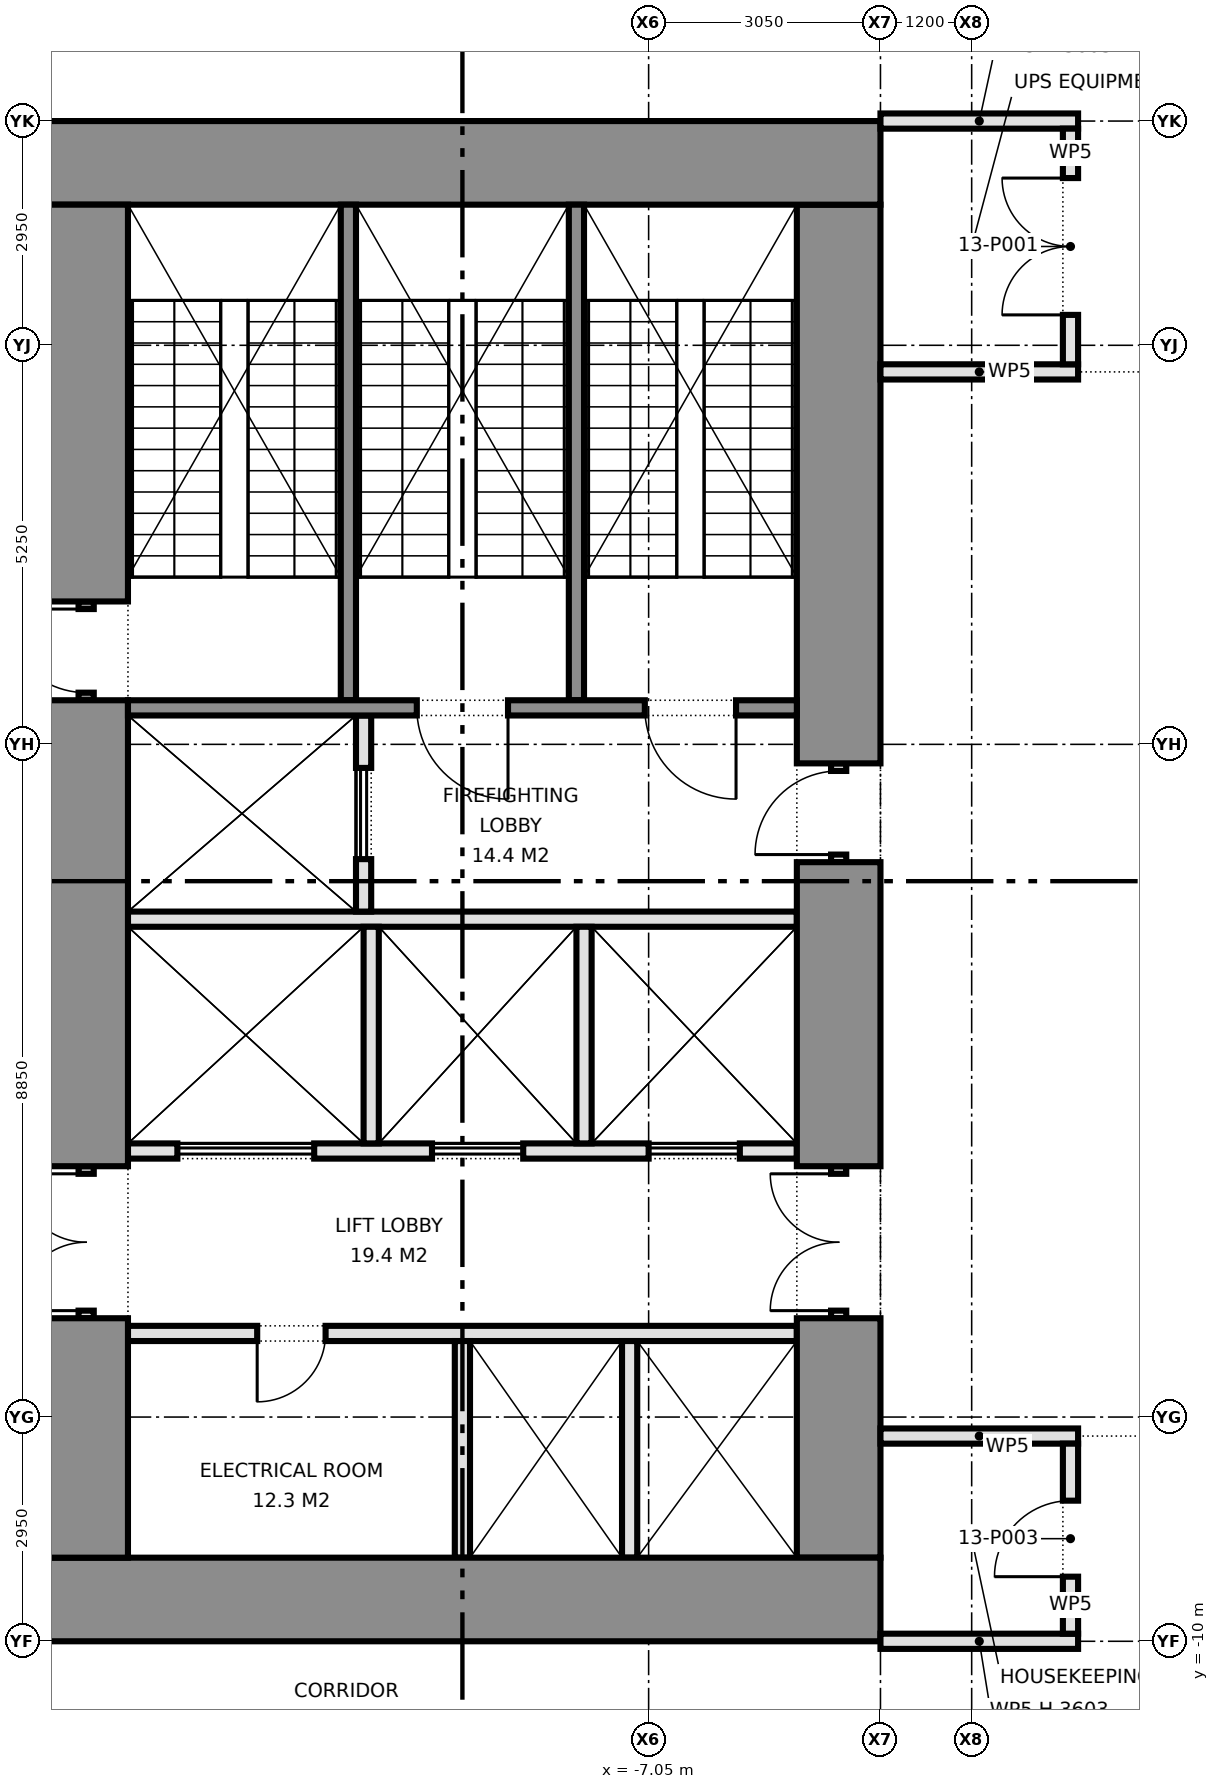
"""IFC4 building model, lengths in metres.
Left out: names, types, materials, properties, quantities, classifications, styles, units other than length and angle.
Written with IfcOpenShell. Run it as: python <this file> out.ifc"""

import sys

from ifc_helpers import new_model, si_unit, direction, frame, frame_2d, origin, place, context, subcontext, project, spatial, rectangle, extrude, element, fill, save


model = new_model("IFC4")
c1 = context("Model", 3, precision=1e-05, world=origin(), true_north=direction((0.0, 1.0)))
c2 = subcontext(c1, "Body", "Model", "MODEL_VIEW")
j1 = project(units=[si_unit("LENGTHUNIT", "METRE"), si_unit("PLANEANGLEUNIT", "RADIAN")], contexts=[c1])
p1 = place(None, origin())
s1 = spatial("IfcSite", under=j1, at=p1, CompositionType="ELEMENT")
p2 = place(p1, origin())
s2 = spatial("IfcBuilding", under=s1, at=p2, CompositionType="ELEMENT")
p3 = place(p2, frame((0.0, 0.0, 59.3)))
s3 = spatial("IfcBuildingStorey", under=s2, at=p3, CompositionType="ELEMENT", Elevation=59.3)
for number, where, z_axis, x_axis in (
    (1, (-15.0, -9.45, 0.0), (0.0, 0.0, 1.0), (1.0, 0.0, 0.0)),
    (2, (-15.0, 9.45, 0.0), (0.0, 0.0, 1.0), (1.0, 0.0, 0.0)),
):
    element("IfcWall", number, at=place(p3, frame(where, z_axis=z_axis, x_axis=x_axis)), inside=s3, PredefinedType="SHEAR", context=c2, shape_type="SweptSolid", body=[
        extrude(rectangle(XDim=11.0, YDim=1.1, at=frame_2d((5.5, 0.0))), origin(), (0.0, 0.0, 1.0), 4.55),
    ])
p4 = place(p3, frame((-14.45, -8.9, 0.0), z_axis=(0.0, 0.0, 1.0), x_axis=(0.0, 1.0, 0.0)))
e3 = element("IfcWall", 3, at=p4, inside=s3, PredefinedType="SHEAR", context=c2, shape_type="SweptSolid", body=[
    extrude(rectangle(XDim=3.15, YDim=1.1, at=frame_2d((1.575, 0.0))), origin(), (0.0, 0.0, 1.0), 4.55),
])
p5 = place(p3, frame((-14.45, -5.75, 0.0), z_axis=(0.0, 0.0, 1.0), x_axis=(0.0, 1.0, 0.0)))
e4 = element("IfcWall", 4, at=p5, inside=s3, PredefinedType="PARTITIONING", context=c2, shape_type="SweptSolid", body=[
    extrude(rectangle(XDim=2.0, YDim=0.2, at=frame_2d((1.0, 0.0))), origin(), (0.0, 0.0, 1.0), 2.4),
])
p6 = place(p5, frame((0.1, 0.0, 0.0)))
e5 = element("IfcOpeningElement", 5, at=p6, cuts=e4, PredefinedType="OPENING", context=c2, shape_type="SweptSolid", body=[
    extrude(rectangle(XDim=1.8, YDim=2.1, at=frame_2d((0.9, 1.05))), frame((0.0, 0.11, 0.0), z_axis=(0.0, -1.0, 0.0), x_axis=(1.0, 0.0, 0.0)), (0.0, 0.0, 1.0), 0.22),
])
p7 = place(p3, frame((-14.45, -3.75, 0.0), z_axis=(0.0, 0.0, 1.0), x_axis=(0.0, 1.0, 0.0)))
e6 = element("IfcWall", 6, at=p7, inside=s3, PredefinedType="SHEAR", context=c2, shape_type="SweptSolid", body=[
    extrude(rectangle(XDim=6.13, YDim=1.1, at=frame_2d((3.065, 0.0))), origin(), (0.0, 0.0, 1.0), 4.55),
])
p8 = place(p3, frame((-14.45, 2.38, 0.0), z_axis=(0.0, 0.0, 1.0), x_axis=(0.0, 1.0, 0.0)))
e7 = element("IfcWall", 7, at=p8, inside=s3, PredefinedType="SHEAR", context=c2, shape_type="SweptSolid", body=[
    extrude(rectangle(XDim=1.3, YDim=0.2, at=frame_2d((0.65, 0.0))), origin(), (0.0, 0.0, 1.0), 2.4),
])
p9 = place(p8, frame((0.1, 0.0, 0.0)))
e8 = element("IfcOpeningElement", 8, at=p9, cuts=e7, PredefinedType="OPENING", context=c2, shape_type="SweptSolid", body=[
    extrude(rectangle(XDim=1.1, YDim=2.1, at=frame_2d((0.55, 1.05))), frame((0.0, 0.11, 0.0), z_axis=(0.0, -1.0, 0.0), x_axis=(1.0, 0.0, 0.0)), (0.0, 0.0, 1.0), 0.22),
])
p10 = place(p3, frame((-14.45, 3.68, 0.0), z_axis=(0.0, 0.0, 1.0), x_axis=(0.0, 1.0, 0.0)))
e9 = element("IfcWall", 9, at=p10, inside=s3, PredefinedType="SHEAR", context=c2, shape_type="SweptSolid", body=[
    extrude(rectangle(XDim=5.22, YDim=1.1, at=frame_2d((2.61, 0.0))), origin(), (0.0, 0.0, 1.0), 4.55),
])
p11 = place(p3, frame((-4.55, -8.9, 0.0), z_axis=(0.0, 0.0, 1.0), x_axis=(0.0, 1.0, 0.0)))
e10 = element("IfcWall", 10, at=p11, inside=s3, PredefinedType="SHEAR", context=c2, shape_type="SweptSolid", body=[
    extrude(rectangle(XDim=3.15, YDim=1.1, at=frame_2d((1.575, 0.0))), origin(), (0.0, 0.0, 1.0), 4.55),
])
p12 = place(p3, frame((-4.55, -5.75, 0.0), z_axis=(0.0, 0.0, 1.0), x_axis=(0.0, 1.0, 0.0)))
e11 = element("IfcWall", 11, at=p12, inside=s3, PredefinedType="PARTITIONING", context=c2, shape_type="SweptSolid", body=[
    extrude(rectangle(XDim=2.0, YDim=0.2, at=frame_2d((1.0, 0.0))), origin(), (0.0, 0.0, 1.0), 2.4),
])
p13 = place(p12, frame((0.1, 0.0, 0.0)))
e12 = element("IfcOpeningElement", 12, at=p13, cuts=e11, PredefinedType="OPENING", context=c2, shape_type="SweptSolid", body=[
    extrude(rectangle(XDim=1.8, YDim=2.1, at=frame_2d((0.9, 1.05))), frame((0.0, 0.11, 0.0), z_axis=(0.0, -1.0, 0.0), x_axis=(1.0, 0.0, 0.0)), (0.0, 0.0, 1.0), 0.22),
])
p14 = place(p3, frame((-4.55, -3.75, 0.0), z_axis=(0.0, 0.0, 1.0), x_axis=(0.0, 1.0, 0.0)))
e13 = element("IfcWall", 13, at=p14, inside=s3, PredefinedType="SHEAR", context=c2, shape_type="SweptSolid", body=[
    extrude(rectangle(XDim=4.0, YDim=1.1, at=frame_2d((2.0, 0.0))), origin(), (0.0, 0.0, 1.0), 4.55),
])
p15 = place(p3, frame((-4.55, 0.25, 0.0), z_axis=(0.0, 0.0, 1.0), x_axis=(0.0, 1.0, 0.0)))
e14 = element("IfcWall", 14, at=p15, inside=s3, PredefinedType="PARTITIONING", context=c2, shape_type="SweptSolid", body=[
    extrude(rectangle(XDim=1.3, YDim=0.2, at=frame_2d((0.65, 0.0))), origin(), (0.0, 0.0, 1.0), 2.4),
])
p16 = place(p15, frame((0.1, 0.0, 0.0)))
e15 = element("IfcOpeningElement", 15, at=p16, cuts=e14, PredefinedType="OPENING", context=c2, shape_type="SweptSolid", body=[
    extrude(rectangle(XDim=1.1, YDim=2.1, at=frame_2d((0.55, 1.05))), frame((0.0, 0.11, 0.0), z_axis=(0.0, -1.0, 0.0), x_axis=(1.0, 0.0, 0.0)), (0.0, 0.0, 1.0), 0.22),
])
p17 = place(p3, frame((-4.55, 1.55, 0.0), z_axis=(0.0, 0.0, 1.0), x_axis=(0.0, 1.0, 0.0)))
e16 = element("IfcWall", 16, at=p17, inside=s3, PredefinedType="SHEAR", context=c2, shape_type="SweptSolid", body=[
    extrude(rectangle(XDim=7.35, YDim=1.1, at=frame_2d((3.675, 0.0))), origin(), (0.0, 0.0, 1.0), 4.55),
])
p18 = place(p3, frame((-13.9, -5.95, 0.0), z_axis=(0.0, 0.0, 1.0), x_axis=(1.0, 0.0, 0.0)))
e17 = element("IfcWall", 17, at=p18, inside=s3, PredefinedType="PARTITIONING", context=c2, shape_type="SweptSolid", body=[
    extrude(rectangle(XDim=8.8, YDim=0.2, at=frame_2d((4.4, 0.0))), origin(), (0.0, 0.0, 1.0), 4.55),
])
p19 = place(p18, frame((1.7, 0.0, 0.0)))
e18 = element("IfcOpeningElement", 18, at=p19, cuts=e17, PredefinedType="OPENING", context=c2, shape_type="SweptSolid", body=[
    extrude(rectangle(XDim=0.9, YDim=2.1, at=frame_2d((0.45, 1.05))), frame((0.0, 0.11, 0.0), z_axis=(0.0, -1.0, 0.0), x_axis=(1.0, 0.0, 0.0)), (0.0, 0.0, 1.0), 0.22),
])
p20 = place(p3, frame((-13.9, -3.55, 0.0), z_axis=(0.0, 0.0, 1.0), x_axis=(1.0, 0.0, 0.0)))
e19 = element("IfcWall", 19, at=p20, inside=s3, PredefinedType="PARTITIONING", context=c2, shape_type="SweptSolid", body=[
    extrude(rectangle(XDim=8.8, YDim=0.2, at=frame_2d((4.4, 0.0))), origin(), (0.0, 0.0, 1.0), 4.55),
])
p21 = place(p20, frame((0.65, 0.0, 0.0)))
e20 = element("IfcOpeningElement", 20, at=p21, cuts=e19, PredefinedType="OPENING", context=c2, shape_type="SweptSolid", body=[
    extrude(rectangle(XDim=1.8, YDim=2.1, at=frame_2d((0.9, 1.05))), frame((0.0, 0.11, 0.0), z_axis=(0.0, -1.0, 0.0), x_axis=(1.0, 0.0, 0.0)), (0.0, 0.0, 1.0), 0.22),
])
p22 = place(p20, frame((4.0, 0.0, 0.0)))
e21 = element("IfcOpeningElement", 21, at=p22, cuts=e19, PredefinedType="OPENING", context=c2, shape_type="SweptSolid", body=[
    extrude(rectangle(XDim=1.2, YDim=2.1, at=frame_2d((0.6, 1.05))), frame((0.0, 0.11, 0.0), z_axis=(0.0, -1.0, 0.0), x_axis=(1.0, 0.0, 0.0)), (0.0, 0.0, 1.0), 0.22),
])
p23 = place(p20, frame((6.85, 0.0, 0.0)))
e22 = element("IfcOpeningElement", 22, at=p23, cuts=e19, PredefinedType="OPENING", context=c2, shape_type="SweptSolid", body=[
    extrude(rectangle(XDim=1.2, YDim=2.1, at=frame_2d((0.6, 1.05))), frame((0.0, 0.11, 0.0), z_axis=(0.0, -1.0, 0.0), x_axis=(1.0, 0.0, 0.0)), (0.0, 0.0, 1.0), 0.22),
])
p24 = place(p3, frame((-13.9, -0.5, 0.0), z_axis=(0.0, 0.0, 1.0), x_axis=(1.0, 0.0, 0.0)))
e23 = element("IfcWall", 23, at=p24, inside=s3, PredefinedType="PARTITIONING", context=c2, shape_type="SweptSolid", body=[
    extrude(rectangle(XDim=8.8, YDim=0.2, at=frame_2d((4.4, 0.0))), origin(), (0.0, 0.0, 1.0), 4.55),
])
p25 = place(p3, frame((-10.8, -0.4, 0.0), z_axis=(0.0, 0.0, 1.0), x_axis=(0.0, 1.0, 0.0)))
e24 = element("IfcWall", 24, at=p25, inside=s3, PredefinedType="PARTITIONING", context=c2, shape_type="SweptSolid", body=[
    extrude(rectangle(XDim=2.58, YDim=0.2, at=frame_2d((1.29, 0.0))), origin(), (0.0, 0.0, 1.0), 4.55),
])
p26 = place(p25, frame((0.69, 0.0, 0.0)))
e25 = element("IfcOpeningElement", 25, at=p26, cuts=e24, PredefinedType="OPENING", context=c2, shape_type="SweptSolid", body=[
    extrude(rectangle(XDim=1.2, YDim=2.1, at=frame_2d((0.6, 1.05))), frame((0.0, 0.11, 0.0), z_axis=(0.0, -1.0, 0.0), x_axis=(1.0, 0.0, 0.0)), (0.0, 0.0, 1.0), 0.22),
])
p27 = place(p3, frame((-13.9, 2.28, 0.0), z_axis=(0.0, 0.0, 1.0), x_axis=(1.0, 0.0, 0.0)))
e26 = element("IfcWall", 26, at=p27, inside=s3, PredefinedType="SHEAR", context=c2, shape_type="SweptSolid", body=[
    extrude(rectangle(XDim=8.8, YDim=0.2, at=frame_2d((4.4, 0.0))), origin(), (0.0, 0.0, 1.0), 4.55),
])
p28 = place(p27, frame((3.8, 0.0, 0.0)))
e27 = element("IfcOpeningElement", 27, at=p28, cuts=e26, PredefinedType="OPENING", context=c2, shape_type="SweptSolid", body=[
    extrude(rectangle(XDim=1.2, YDim=2.1, at=frame_2d((0.6, 1.05))), frame((0.0, 0.11, 0.0), z_axis=(0.0, -1.0, 0.0), x_axis=(1.0, 0.0, 0.0)), (0.0, 0.0, 1.0), 0.22),
])
p29 = place(p27, frame((6.8, 0.0, 0.0)))
e28 = element("IfcOpeningElement", 28, at=p29, cuts=e26, PredefinedType="OPENING", context=c2, shape_type="SweptSolid", body=[
    extrude(rectangle(XDim=1.2, YDim=2.1, at=frame_2d((0.6, 1.05))), frame((0.0, 0.11, 0.0), z_axis=(0.0, -1.0, 0.0), x_axis=(1.0, 0.0, 0.0)), (0.0, 0.0, 1.0), 0.22),
])
for number, where, z_axis, x_axis in (
    (29, (-11.0, 2.38, 0.0), (0.0, 0.0, 1.0), (0.0, 1.0, 0.0)),
    (30, (-8.0, 2.38, 0.0), (0.0, 0.0, 1.0), (0.0, 1.0, 0.0)),
):
    element("IfcWall", number, at=place(p3, frame(where, z_axis=z_axis, x_axis=x_axis)), inside=s3, PredefinedType="SHEAR", context=c2, shape_type="SweptSolid", body=[
        extrude(rectangle(XDim=6.52, YDim=0.2, at=frame_2d((3.26, 0.0))), origin(), (0.0, 0.0, 1.0), 4.55),
    ])
for number, where, z_axis, x_axis in (
    (31, (-9.5, -8.9, 0.0), (0.0, 0.0, 1.0), (0.0, 1.0, 0.0)),
    (32, (-7.3, -8.9, 0.0), (0.0, 0.0, 1.0), (0.0, 1.0, 0.0)),
    (33, (-10.7, -3.45, 0.0), (0.0, 0.0, 1.0), (0.0, 1.0, 0.0)),
    (34, (-7.9, -3.45, 0.0), (0.0, 0.0, 1.0), (0.0, 1.0, 0.0)),
):
    element("IfcWall", number, at=place(p3, frame(where, z_axis=z_axis, x_axis=x_axis)), inside=s3, PredefinedType="PARTITIONING", context=c2, shape_type="SweptSolid", body=[
        extrude(rectangle(XDim=2.85, YDim=0.2, at=frame_2d((1.425, 0.0))), origin(), (0.0, 0.0, 1.0), 4.55),
    ])
p30 = place(p3, frame((-4.0, -10.0, 0.0), z_axis=(0.0, 0.0, 1.0), x_axis=(1.0, 0.0, 0.0)))
e35 = element("IfcWall", 35, at=p30, inside=s3, PredefinedType="PARTITIONING", context=c2, shape_type="SweptSolid", body=[
    extrude(rectangle(XDim=2.6, YDim=0.2, at=frame_2d((1.3, 0.0))), origin(), (0.0, 0.0, 1.0), 3.603),
])
for number, where, z_axis, x_axis in (
    (36, (-4.0, -7.3, 0.0), (0.0, 0.0, 1.0), (1.0, 0.0, 0.0)),
    (37, (-4.0, 6.7, 0.0), (0.0, 0.0, 1.0), (1.0, 0.0, 0.0)),
):
    element("IfcWall", number, at=place(p3, frame(where, z_axis=z_axis, x_axis=x_axis)), inside=s3, PredefinedType="PARTITIONING", context=c2, shape_type="SweptSolid", body=[
        extrude(rectangle(XDim=2.6, YDim=0.2, at=frame_2d((1.3, 0.0))), origin(), (0.0, 0.0, 1.0), 4.55),
    ])
p31 = place(p3, frame((-4.0, 10.0, 0.0), z_axis=(0.0, 0.0, 1.0), x_axis=(1.0, 0.0, 0.0)))
e38 = element("IfcWall", 38, at=p31, inside=s3, PredefinedType="PARTITIONING", context=c2, shape_type="SweptSolid", body=[
    extrude(rectangle(XDim=2.6, YDim=0.2, at=frame_2d((1.3, 0.0))), origin(), (0.0, 0.0, 1.0), 3.603),
])
p32 = place(p3, frame((-1.5, -9.9, 0.0), z_axis=(0.0, 0.0, 1.0), x_axis=(0.0, 1.0, 0.0)))
e39 = element("IfcWall", 39, at=p32, inside=s3, PredefinedType="PARTITIONING", context=c2, shape_type="SweptSolid", body=[
    extrude(rectangle(XDim=2.5, YDim=0.2, at=frame_2d((1.25, 0.0))), origin(), (0.0, 0.0, 1.0), 4.55),
])
p33 = place(p32, frame((0.75, 0.0, 0.0)))
e40 = element("IfcOpeningElement", 40, at=p33, cuts=e39, PredefinedType="OPENING", context=c2, shape_type="SweptSolid", body=[
    extrude(rectangle(XDim=1.0, YDim=2.1, at=frame_2d((0.5, 1.05))), frame((0.0, 0.11, 0.0), z_axis=(0.0, -1.0, 0.0), x_axis=(1.0, 0.0, 0.0)), (0.0, 0.0, 1.0), 0.22),
])
p34 = place(p3, frame((-1.5, 6.8, 0.0), z_axis=(0.0, 0.0, 1.0), x_axis=(0.0, 1.0, 0.0)))
e41 = element("IfcWall", 41, at=p34, inside=s3, PredefinedType="PARTITIONING", context=c2, shape_type="SweptSolid", body=[
    extrude(rectangle(XDim=3.1, YDim=0.2, at=frame_2d((1.55, 0.0))), origin(), (0.0, 0.0, 1.0), 4.55),
])
p35 = place(p34, frame((0.65, 0.0, 0.0)))
e42 = element("IfcOpeningElement", 42, at=p35, cuts=e41, PredefinedType="OPENING", context=c2, shape_type="SweptSolid", body=[
    extrude(rectangle(XDim=1.8, YDim=2.1, at=frame_2d((0.9, 1.05))), frame((0.0, 0.11, 0.0), z_axis=(0.0, -1.0, 0.0), x_axis=(1.0, 0.0, 0.0)), (0.0, 0.0, 1.0), 0.22),
])
p36 = place(p6, origin())
e43 = element("IfcDoor", 43, at=p36, inside=s3, OperationType="DOUBLE_DOOR_SINGLE_SWING", PredefinedType="DOOR", context=c2, shape_type="SweptSolid", body=[
    extrude(rectangle(XDim=1.8, YDim=2.1, at=frame_2d((0.9, 1.05))), frame((0.0, 0.025, 0.0), z_axis=(0.0, -1.0, 0.0), x_axis=(1.0, 0.0, 0.0)), (0.0, 0.0, 1.0), 0.05),
])
fill(e5, e43)
p37 = place(p9, origin())
e44 = element("IfcDoor", 44, at=p37, inside=s3, OperationType="SINGLE_SWING_RIGHT", PredefinedType="DOOR", context=c2, shape_type="SweptSolid", body=[
    extrude(rectangle(XDim=1.1, YDim=2.1, at=frame_2d((0.55, 1.05))), frame((0.0, 0.025, 0.0), z_axis=(0.0, -1.0, 0.0), x_axis=(1.0, 0.0, 0.0)), (0.0, 0.0, 1.0), 0.05),
])
fill(e8, e44)
p38 = place(p13, origin())
e45 = element("IfcDoor", 45, at=p38, inside=s3, OperationType="DOUBLE_DOOR_SINGLE_SWING", PredefinedType="DOOR", context=c2, shape_type="SweptSolid", body=[
    extrude(rectangle(XDim=1.8, YDim=2.1, at=frame_2d((0.9, 1.05))), frame((0.0, 0.025, 0.0), z_axis=(0.0, -1.0, 0.0), x_axis=(1.0, 0.0, 0.0)), (0.0, 0.0, 1.0), 0.05),
])
fill(e12, e45)
p39 = place(p16, origin())
e46 = element("IfcDoor", 46, at=p39, inside=s3, OperationType="SINGLE_SWING_LEFT", PredefinedType="DOOR", context=c2, shape_type="SweptSolid", body=[
    extrude(rectangle(XDim=1.1, YDim=2.1, at=frame_2d((0.55, 1.05))), frame((0.0, 0.025, 0.0), z_axis=(0.0, -1.0, 0.0), x_axis=(1.0, 0.0, 0.0)), (0.0, 0.0, 1.0), 0.05),
])
fill(e15, e46)
p40 = place(p21, origin())
e47 = element("IfcDoor", 47, at=p40, inside=s3, OperationType="DOUBLE_DOOR_SLIDING", PredefinedType="DOOR", context=c2, shape_type="SweptSolid", body=[
    extrude(rectangle(XDim=1.8, YDim=2.1, at=frame_2d((0.9, 1.05))), frame((0.0, 0.025, 0.0), z_axis=(0.0, -1.0, 0.0), x_axis=(1.0, 0.0, 0.0)), (0.0, 0.0, 1.0), 0.05),
])
fill(e20, e47)
p41 = place(p22, origin())
e48 = element("IfcDoor", 48, at=p41, inside=s3, OperationType="DOUBLE_DOOR_SLIDING", PredefinedType="DOOR", context=c2, shape_type="SweptSolid", body=[
    extrude(rectangle(XDim=1.2, YDim=2.1, at=frame_2d((0.6, 1.05))), frame((0.0, 0.025, 0.0), z_axis=(0.0, -1.0, 0.0), x_axis=(1.0, 0.0, 0.0)), (0.0, 0.0, 1.0), 0.05),
])
fill(e21, e48)
p42 = place(p23, origin())
e49 = element("IfcDoor", 49, at=p42, inside=s3, OperationType="DOUBLE_DOOR_SLIDING", PredefinedType="DOOR", context=c2, shape_type="SweptSolid", body=[
    extrude(rectangle(XDim=1.2, YDim=2.1, at=frame_2d((0.6, 1.05))), frame((0.0, 0.025, 0.0), z_axis=(0.0, -1.0, 0.0), x_axis=(1.0, 0.0, 0.0)), (0.0, 0.0, 1.0), 0.05),
])
fill(e22, e49)
p43 = place(p26, origin())
e50 = element("IfcDoor", 50, at=p43, inside=s3, OperationType="DOUBLE_DOOR_SLIDING", PredefinedType="DOOR", context=c2, shape_type="SweptSolid", body=[
    extrude(rectangle(XDim=1.2, YDim=2.1, at=frame_2d((0.6, 1.05))), frame((0.0, 0.025, 0.0), z_axis=(0.0, -1.0, 0.0), x_axis=(1.0, 0.0, 0.0)), (0.0, 0.0, 1.0), 0.05),
])
fill(e25, e50)
p44 = place(p19, frame((0.9, 0.0, 0.0), z_axis=(0.0, 0.0, 1.0), x_axis=(-1.0, 0.0, 0.0)))
e51 = element("IfcDoor", 51, at=p44, inside=s3, OperationType="SINGLE_SWING_RIGHT", PredefinedType="DOOR", context=c2, shape_type="SweptSolid", body=[
    extrude(rectangle(XDim=0.9, YDim=2.1, at=frame_2d((0.45, 1.05))), frame((0.0, 0.025, 0.0), z_axis=(0.0, -1.0, 0.0), x_axis=(1.0, 0.0, 0.0)), (0.0, 0.0, 1.0), 0.05),
])
fill(e18, e51)
p45 = place(p28, frame((1.2, 0.0, 0.0), z_axis=(0.0, 0.0, 1.0), x_axis=(-1.0, 0.0, 0.0)))
e52 = element("IfcDoor", 52, at=p45, inside=s3, OperationType="SINGLE_SWING_LEFT", PredefinedType="DOOR", context=c2, shape_type="SweptSolid", body=[
    extrude(rectangle(XDim=1.2, YDim=2.1, at=frame_2d((0.6, 1.05))), frame((0.0, 0.025, 0.0), z_axis=(0.0, -1.0, 0.0), x_axis=(1.0, 0.0, 0.0)), (0.0, 0.0, 1.0), 0.05),
])
fill(e27, e52)
p46 = place(p29, frame((1.2, 0.0, 0.0), z_axis=(0.0, 0.0, 1.0), x_axis=(-1.0, 0.0, 0.0)))
e53 = element("IfcDoor", 53, at=p46, inside=s3, OperationType="SINGLE_SWING_LEFT", PredefinedType="DOOR", context=c2, shape_type="SweptSolid", body=[
    extrude(rectangle(XDim=1.2, YDim=2.1, at=frame_2d((0.6, 1.05))), frame((0.0, 0.025, 0.0), z_axis=(0.0, -1.0, 0.0), x_axis=(1.0, 0.0, 0.0)), (0.0, 0.0, 1.0), 0.05),
])
fill(e28, e53)
p47 = place(p35, origin())
e54 = element("IfcDoor", 54, at=p47, inside=s3, OperationType="DOUBLE_DOOR_SINGLE_SWING", PredefinedType="DOOR", context=c2, shape_type="SweptSolid", body=[
    extrude(rectangle(XDim=1.8, YDim=2.1, at=frame_2d((0.9, 1.05))), frame((0.0, 0.025, 0.0), z_axis=(0.0, -1.0, 0.0), x_axis=(1.0, 0.0, 0.0)), (0.0, 0.0, 1.0), 0.05),
])
fill(e42, e54)
p48 = place(p33, origin())
e55 = element("IfcDoor", 55, at=p48, inside=s3, OperationType="SINGLE_SWING_LEFT", PredefinedType="DOOR", context=c2, shape_type="SweptSolid", body=[
    extrude(rectangle(XDim=1.0, YDim=2.1, at=frame_2d((0.5, 1.05))), frame((0.0, 0.025, 0.0), z_axis=(0.0, -1.0, 0.0), x_axis=(1.0, 0.0, 0.0)), (0.0, 0.0, 1.0), 0.05),
])
fill(e40, e55)
save(model, sys.argv[1])
